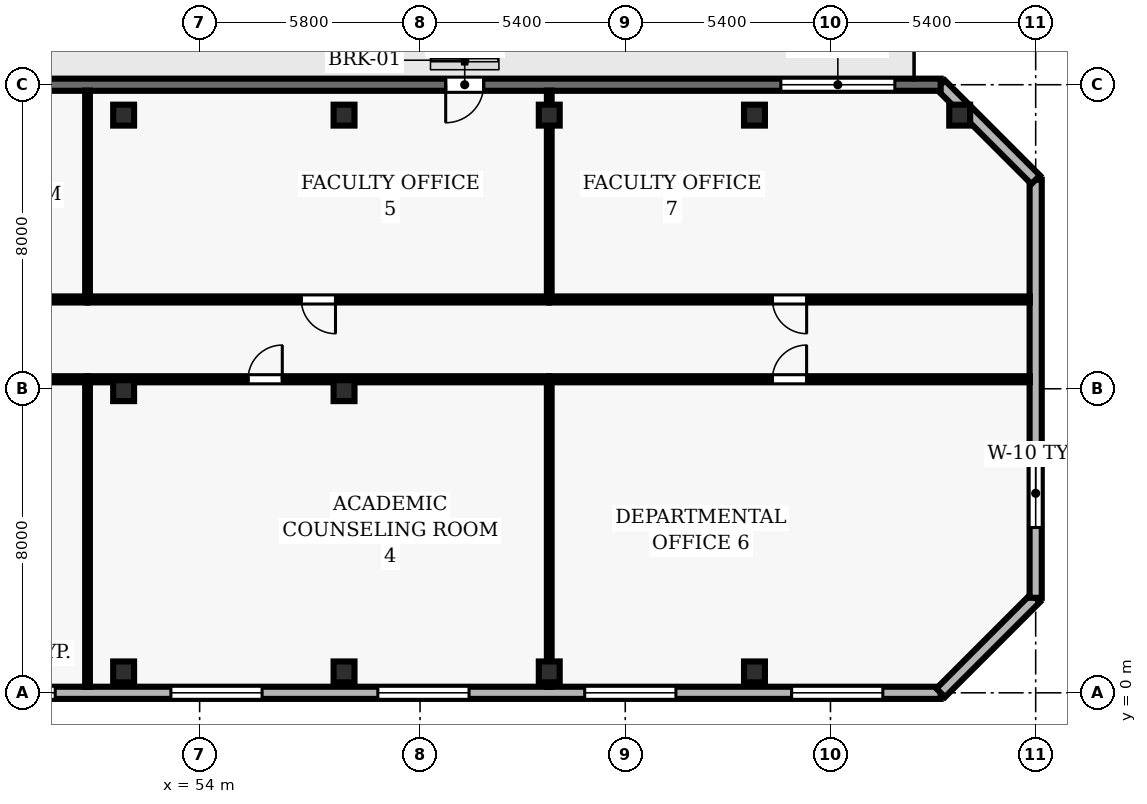
"""IFC4 building model, lengths in metres.
Left out: names, types, materials, properties, quantities, classifications, styles, units other than length and angle.
Written with IfcOpenShell. Run it as: python <this file> out.ifc"""

import sys

from ifc_helpers import new_model, si_unit, direction, frame, frame_2d, origin, origin_2d, place, context, subcontext, project, spatial, rectangle, hollow_rectangle, extrude, element, fill, save


model = new_model("IFC4")
c1 = context("Model", 3, precision=1e-05, world=origin(), true_north=direction((0.0, 1.0)))
c2 = subcontext(c1, "Body", "Model", "MODEL_VIEW")
j1 = project(units=[si_unit("LENGTHUNIT", "METRE"), si_unit("PLANEANGLEUNIT", "RADIAN")], contexts=[c1])
p1 = place(None, origin())
s1 = spatial("IfcSite", under=j1, at=p1, CompositionType="ELEMENT")
p2 = place(p1, origin())
s2 = spatial("IfcBuilding", under=s1, at=p2, CompositionType="ELEMENT")
p3 = place(p2, frame((0.0, 0.0, 81.7)))
s3 = spatial("IfcBuildingStorey", under=s2, at=p3, CompositionType="ELEMENT", Elevation=81.7)
for number, where, z_axis, x_axis in (
    (1, (52.0, 0.55, 0.0), (0.0, 0.0, 1.0), (1.0, 0.0, 0.0)),
    (2, (52.0, 7.95, 0.0), (0.0, 0.0, 1.0), (1.0, 0.0, 0.0)),
    (3, (52.0, 15.2, 0.0), (0.0, 0.0, 1.0), (1.0, 0.0, 0.0)),
    (4, (57.8, 0.55, 0.0), (0.0, 0.0, 1.0), (1.0, 0.0, 0.0)),
    (5, (57.8, 7.95, 0.0), (0.0, 0.0, 1.0), (1.0, 0.0, 0.0)),
    (6, (57.8, 15.2, 0.0), (0.0, 0.0, 1.0), (1.0, 0.0, 0.0)),
    (7, (63.2, 0.55, 0.0), (0.0, 0.0, 1.0), (1.0, 0.0, 0.0)),
    (8, (63.2, 15.2, 0.0), (0.0, 0.0, 1.0), (1.0, 0.0, 0.0)),
    (9, (68.6, 0.55, 0.0), (0.0, 0.0, 1.0), (1.0, 0.0, 0.0)),
    (10, (68.6, 15.2, 0.0), (0.0, 0.0, 1.0), (1.0, 0.0, 0.0)),
    (11, (74.0, 15.2, 0.0), (0.0, 0.0, 1.0), (1.0, 0.0, 0.0)),
):
    element("IfcColumn", number, at=place(p3, frame(where, z_axis=z_axis, x_axis=x_axis)), inside=s3, PredefinedType="COLUMN", context=c2, shape_type="SweptSolid", body=[
        extrude(hollow_rectangle(XDim=0.55, YDim=0.55, WallThickness=0.025, at=origin_2d()), origin(), (0.0, 0.0, 1.0), 3.9),
    ])
p4 = place(p3, frame((24.5, 0.0, 0.0), z_axis=(0.0, 0.0, 1.0), x_axis=(1.0, 0.0, 0.0)))
e12 = element("IfcWall", 12, at=p4, inside=s3, PredefinedType="SOLIDWALL", context=c2, shape_type="SweptSolid", body=[
    extrude(rectangle(XDim=49.0, YDim=0.32, at=frame_2d((24.5, 0.0))), origin(), (0.0, 0.0, 1.0), 3.69),
])
p5 = place(p4, frame((1.522, 0.0, 0.9)))
e13 = element("IfcOpeningElement", 13, at=p5, cuts=e12, PredefinedType="OPENING", context=c2, shape_type="SweptSolid", body=[
    extrude(rectangle(XDim=2.4, YDim=1.8, at=frame_2d((1.2, 0.9))), frame((0.0, 0.17, 0.0), z_axis=(0.0, -1.0, 0.0), x_axis=(1.0, 0.0, 0.0)), (0.0, 0.0, 1.0), 0.34),
])
p6 = place(p4, frame((17.856, 0.0, 0.9)))
e14 = element("IfcOpeningElement", 14, at=p6, cuts=e12, PredefinedType="OPENING", context=c2, shape_type="SweptSolid", body=[
    extrude(rectangle(XDim=2.4, YDim=1.8, at=frame_2d((1.2, 0.9))), frame((0.0, 0.17, 0.0), z_axis=(0.0, -1.0, 0.0), x_axis=(1.0, 0.0, 0.0)), (0.0, 0.0, 1.0), 0.34),
])
p7 = place(p4, frame((23.3, 0.0, 0.9)))
e15 = element("IfcOpeningElement", 15, at=p7, cuts=e12, PredefinedType="OPENING", context=c2, shape_type="SweptSolid", body=[
    extrude(rectangle(XDim=2.4, YDim=1.8, at=frame_2d((1.2, 0.9))), frame((0.0, 0.17, 0.0), z_axis=(0.0, -1.0, 0.0), x_axis=(1.0, 0.0, 0.0)), (0.0, 0.0, 1.0), 0.34),
])
p8 = place(p4, frame((28.744, 0.0, 0.9)))
e16 = element("IfcOpeningElement", 16, at=p8, cuts=e12, PredefinedType="OPENING", context=c2, shape_type="SweptSolid", body=[
    extrude(rectangle(XDim=2.4, YDim=1.8, at=frame_2d((1.2, 0.9))), frame((0.0, 0.17, 0.0), z_axis=(0.0, -1.0, 0.0), x_axis=(1.0, 0.0, 0.0)), (0.0, 0.0, 1.0), 0.34),
])
p9 = place(p4, frame((34.189, 0.0, 0.9)))
e17 = element("IfcOpeningElement", 17, at=p9, cuts=e12, PredefinedType="OPENING", context=c2, shape_type="SweptSolid", body=[
    extrude(rectangle(XDim=2.4, YDim=1.8, at=frame_2d((1.2, 0.9))), frame((0.0, 0.17, 0.0), z_axis=(0.0, -1.0, 0.0), x_axis=(1.0, 0.0, 0.0)), (0.0, 0.0, 1.0), 0.34),
])
p10 = place(p4, frame((39.633, 0.0, 0.9)))
e18 = element("IfcOpeningElement", 18, at=p10, cuts=e12, PredefinedType="OPENING", context=c2, shape_type="SweptSolid", body=[
    extrude(rectangle(XDim=2.4, YDim=1.8, at=frame_2d((1.2, 0.9))), frame((0.0, 0.17, 0.0), z_axis=(0.0, -1.0, 0.0), x_axis=(1.0, 0.0, 0.0)), (0.0, 0.0, 1.0), 0.34),
])
p11 = place(p4, frame((45.078, 0.0, 0.9)))
e19 = element("IfcOpeningElement", 19, at=p11, cuts=e12, PredefinedType="OPENING", context=c2, shape_type="SweptSolid", body=[
    extrude(rectangle(XDim=2.4, YDim=1.8, at=frame_2d((1.2, 0.9))), frame((0.0, 0.17, 0.0), z_axis=(0.0, -1.0, 0.0), x_axis=(1.0, 0.0, 0.0)), (0.0, 0.0, 1.0), 0.34),
])
p12 = place(p3, frame((73.5, 0.0, 0.0), z_axis=(0.0, 0.0, 1.0), x_axis=(0.707106781187, 0.707106781187, 0.0)))
e20 = element("IfcWall", 20, at=p12, inside=s3, PredefinedType="SOLIDWALL", context=c2, shape_type="SweptSolid", body=[
    extrude(rectangle(XDim=3.536, YDim=0.32, at=frame_2d((1.768, 0.0))), origin(), (0.0, 0.0, 1.0), 3.69),
])
p13 = place(p3, frame((76.0, 2.5, 0.0), z_axis=(0.0, 0.0, 1.0), x_axis=(0.0, 1.0, 0.0)))
e21 = element("IfcWall", 21, at=p13, inside=s3, PredefinedType="SOLIDWALL", context=c2, shape_type="SweptSolid", body=[
    extrude(rectangle(XDim=11.0, YDim=0.32, at=frame_2d((5.5, 0.0))), origin(), (0.0, 0.0, 1.0), 3.69),
])
p14 = place(p13, frame((1.85, 0.0, 0.9)))
e22 = element("IfcOpeningElement", 22, at=p14, cuts=e21, PredefinedType="OPENING", context=c2, shape_type="SweptSolid", body=[
    extrude(rectangle(XDim=1.8, YDim=2.2, at=frame_2d((0.9, 1.1))), frame((0.0, 0.17, 0.0), z_axis=(0.0, -1.0, 0.0), x_axis=(1.0, 0.0, 0.0)), (0.0, 0.0, 1.0), 0.34),
])
p15 = place(p3, frame((76.0, 13.5, 0.0), z_axis=(0.0, 0.0, 1.0), x_axis=(-0.707106781187, 0.707106781187, 0.0)))
e23 = element("IfcWall", 23, at=p15, inside=s3, PredefinedType="SOLIDWALL", context=c2, shape_type="SweptSolid", body=[
    extrude(rectangle(XDim=3.536, YDim=0.32, at=frame_2d((1.768, 0.0))), origin(), (0.0, 0.0, 1.0), 3.69),
])
p16 = place(p3, frame((73.5, 16.0, 0.0), z_axis=(0.0, 0.0, 1.0), x_axis=(-1.0, 0.0, 0.0)))
e24 = element("IfcWall", 24, at=p16, inside=s3, PredefinedType="SOLIDWALL", context=c2, shape_type="SweptSolid", body=[
    extrude(rectangle(XDim=25.25, YDim=0.32, at=frame_2d((12.625, 0.0))), origin(), (0.0, 0.0, 1.0), 3.69),
])
p17 = place(p16, frame((12.025, 0.0, 0.0)))
e25 = element("IfcOpeningElement", 25, at=p17, cuts=e24, PredefinedType="OPENING", context=c2, shape_type="SweptSolid", body=[
    extrude(rectangle(XDim=1.0, YDim=2.2, at=frame_2d((0.5, 1.1))), frame((0.0, 0.17, 0.0), z_axis=(0.0, -1.0, 0.0), x_axis=(1.0, 0.0, 0.0)), (0.0, 0.0, 1.0), 0.34),
])
p18 = place(p16, frame((1.206, 0.0, 0.9)))
e26 = element("IfcOpeningElement", 26, at=p18, cuts=e24, PredefinedType="OPENING", context=c2, shape_type="SweptSolid", body=[
    extrude(rectangle(XDim=3.0, YDim=2.2, at=frame_2d((1.5, 1.1))), frame((0.0, 0.17, 0.0), z_axis=(0.0, -1.0, 0.0), x_axis=(1.0, 0.0, 0.0)), (0.0, 0.0, 1.0), 0.34),
])
p19 = place(p3, frame((40.35, 8.25, 0.0), z_axis=(0.0, 0.0, 1.0), x_axis=(1.0, 0.0, 0.0)))
e27 = element("IfcWall", 27, at=p19, inside=s3, PredefinedType="PARTITIONING", context=c2, shape_type="SweptSolid", body=[
    extrude(rectangle(XDim=10.7, YDim=0.16, at=frame_2d((5.35, 0.0))), origin(), (0.0, 0.0, 1.0), 3.055),
])
p20 = place(p19, frame((3.15, 0.0, 0.0)))
e28 = element("IfcOpeningElement", 28, at=p20, cuts=e27, PredefinedType="OPENING", context=c2, shape_type="SweptSolid", body=[
    extrude(rectangle(XDim=0.9, YDim=2.1, at=frame_2d((0.45, 1.05))), frame((0.0, 0.09, 0.0), z_axis=(0.0, -1.0, 0.0), x_axis=(1.0, 0.0, 0.0)), (0.0, 0.0, 1.0), 0.18),
])
p21 = place(p3, frame((51.05, 8.25, 0.0), z_axis=(0.0, 0.0, 1.0), x_axis=(1.0, 0.0, 0.0)))
e29 = element("IfcWall", 29, at=p21, inside=s3, PredefinedType="PARTITIONING", context=c2, shape_type="SweptSolid", body=[
    extrude(rectangle(XDim=12.15, YDim=0.16, at=frame_2d((6.075, 0.0))), origin(), (0.0, 0.0, 1.0), 3.055),
])
p22 = place(p21, frame((4.225, 0.0, 0.0)))
e30 = element("IfcOpeningElement", 30, at=p22, cuts=e29, PredefinedType="OPENING", context=c2, shape_type="SweptSolid", body=[
    extrude(rectangle(XDim=0.9, YDim=2.1, at=frame_2d((0.45, 1.05))), frame((0.0, 0.09, 0.0), z_axis=(0.0, -1.0, 0.0), x_axis=(1.0, 0.0, 0.0)), (0.0, 0.0, 1.0), 0.18),
])
p23 = place(p3, frame((51.05, 10.35, 0.0), z_axis=(0.0, 0.0, 1.0), x_axis=(-1.0, 0.0, 0.0)))
e31 = element("IfcWall", 31, at=p23, inside=s3, PredefinedType="PARTITIONING", context=c2, shape_type="SweptSolid", body=[
    extrude(rectangle(XDim=10.7, YDim=0.16, at=frame_2d((5.35, 0.0))), origin(), (0.0, 0.0, 1.0), 3.277),
])
p24 = place(p23, frame((4.9, 0.0, 0.0)))
e32 = element("IfcOpeningElement", 32, at=p24, cuts=e31, PredefinedType="OPENING", context=c2, shape_type="SweptSolid", body=[
    extrude(rectangle(XDim=0.9, YDim=2.1, at=frame_2d((0.45, 1.05))), frame((0.0, 0.09, 0.0), z_axis=(0.0, -1.0, 0.0), x_axis=(1.0, 0.0, 0.0)), (0.0, 0.0, 1.0), 0.18),
])
p25 = place(p3, frame((63.2, 8.25, 0.0), z_axis=(0.0, 0.0, 1.0), x_axis=(1.0, 0.0, 0.0)))
e33 = element("IfcWall", 33, at=p25, inside=s3, PredefinedType="PARTITIONING", context=c2, shape_type="SweptSolid", body=[
    extrude(rectangle(XDim=12.645, YDim=0.16, at=frame_2d((6.323, 0.0))), origin(), (0.0, 0.0, 1.0), 3.69),
])
p26 = place(p25, frame((5.872, 0.0, 0.0)))
e34 = element("IfcOpeningElement", 34, at=p26, cuts=e33, PredefinedType="OPENING", context=c2, shape_type="SweptSolid", body=[
    extrude(rectangle(XDim=0.9, YDim=2.1, at=frame_2d((0.45, 1.05))), frame((0.0, 0.09, 0.0), z_axis=(0.0, -1.0, 0.0), x_axis=(1.0, 0.0, 0.0)), (0.0, 0.0, 1.0), 0.18),
])
p27 = place(p3, frame((63.2, 10.35, 0.0), z_axis=(0.0, 0.0, 1.0), x_axis=(-1.0, 0.0, 0.0)))
e35 = element("IfcWall", 35, at=p27, inside=s3, PredefinedType="PARTITIONING", context=c2, shape_type="SweptSolid", body=[
    extrude(rectangle(XDim=12.15, YDim=0.16, at=frame_2d((6.075, 0.0))), origin(), (0.0, 0.0, 1.0), 3.277),
])
p28 = place(p27, frame((5.625, 0.0, 0.0)))
e36 = element("IfcOpeningElement", 36, at=p28, cuts=e35, PredefinedType="OPENING", context=c2, shape_type="SweptSolid", body=[
    extrude(rectangle(XDim=0.9, YDim=2.1, at=frame_2d((0.45, 1.05))), frame((0.0, 0.09, 0.0), z_axis=(0.0, -1.0, 0.0), x_axis=(1.0, 0.0, 0.0)), (0.0, 0.0, 1.0), 0.18),
])
p29 = place(p3, frame((75.845, 10.35, 0.0), z_axis=(0.0, 0.0, 1.0), x_axis=(-1.0, 0.0, 0.0)))
e37 = element("IfcWall", 37, at=p29, inside=s3, PredefinedType="PARTITIONING", context=c2, shape_type="SweptSolid", body=[
    extrude(rectangle(XDim=12.645, YDim=0.16, at=frame_2d((6.323, 0.0))), origin(), (0.0, 0.0, 1.0), 3.277),
])
p30 = place(p29, frame((5.872, 0.0, 0.0)))
e38 = element("IfcOpeningElement", 38, at=p30, cuts=e37, PredefinedType="OPENING", context=c2, shape_type="SweptSolid", body=[
    extrude(rectangle(XDim=0.9, YDim=2.1, at=frame_2d((0.45, 1.05))), frame((0.0, 0.09, 0.0), z_axis=(0.0, -1.0, 0.0), x_axis=(1.0, 0.0, 0.0)), (0.0, 0.0, 1.0), 0.18),
])
p31 = place(p3, frame((51.05, 0.155, 0.0), z_axis=(0.0, 0.0, 1.0), x_axis=(0.0, 1.0, 0.0)))
e39 = element("IfcWall", 39, at=p31, inside=s3, PredefinedType="PARTITIONING", context=c2, shape_type="SweptSolid", body=[
    extrude(rectangle(XDim=8.02, YDim=0.125, at=frame_2d((4.01, 0.0))), origin(), (0.0, 0.0, 1.0), 3.69),
])
p32 = place(p3, frame((51.05, 10.425, 0.0), z_axis=(0.0, 0.0, 1.0), x_axis=(0.0, 1.0, 0.0)))
e40 = element("IfcWall", 40, at=p32, inside=s3, PredefinedType="PARTITIONING", context=c2, shape_type="SweptSolid", body=[
    extrude(rectangle(XDim=5.42, YDim=0.125, at=frame_2d((2.71, 0.0))), origin(), (0.0, 0.0, 1.0), 3.69),
])
p33 = place(p3, frame((63.2, 0.155, 0.0), z_axis=(0.0, 0.0, 1.0), x_axis=(0.0, 1.0, 0.0)))
e41 = element("IfcWall", 41, at=p33, inside=s3, PredefinedType="PARTITIONING", context=c2, shape_type="SweptSolid", body=[
    extrude(rectangle(XDim=8.02, YDim=0.125, at=frame_2d((4.01, 0.0))), origin(), (0.0, 0.0, 1.0), 3.055),
])
p34 = place(p3, frame((63.2, 10.425, 0.0), z_axis=(0.0, 0.0, 1.0), x_axis=(0.0, 1.0, 0.0)))
e42 = element("IfcWall", 42, at=p34, inside=s3, PredefinedType="PARTITIONING", context=c2, shape_type="SweptSolid", body=[
    extrude(rectangle(XDim=5.42, YDim=0.125, at=frame_2d((2.71, 0.0))), origin(), (0.0, 0.0, 1.0), 3.055),
])
p35 = place(p7, origin())
e43 = element("IfcWindow", 43, at=p35, inside=s3, PartitioningType="SINGLE_PANEL", PredefinedType="WINDOW", context=c2, shape_type="SweptSolid", body=[
    extrude(rectangle(XDim=2.4, YDim=1.8, at=frame_2d((1.2, 0.9))), frame((0.0, 0.03, 0.0), z_axis=(0.0, -1.0, 0.0), x_axis=(1.0, 0.0, 0.0)), (0.0, 0.0, 1.0), 0.06),
])
fill(e15, e43)
p36 = place(p8, origin())
e44 = element("IfcWindow", 44, at=p36, inside=s3, PartitioningType="SINGLE_PANEL", PredefinedType="WINDOW", context=c2, shape_type="SweptSolid", body=[
    extrude(rectangle(XDim=2.4, YDim=1.8, at=frame_2d((1.2, 0.9))), frame((0.0, 0.03, 0.0), z_axis=(0.0, -1.0, 0.0), x_axis=(1.0, 0.0, 0.0)), (0.0, 0.0, 1.0), 0.06),
])
fill(e16, e44)
p37 = place(p9, origin())
e45 = element("IfcWindow", 45, at=p37, inside=s3, PartitioningType="SINGLE_PANEL", PredefinedType="WINDOW", context=c2, shape_type="SweptSolid", body=[
    extrude(rectangle(XDim=2.4, YDim=1.8, at=frame_2d((1.2, 0.9))), frame((0.0, 0.03, 0.0), z_axis=(0.0, -1.0, 0.0), x_axis=(1.0, 0.0, 0.0)), (0.0, 0.0, 1.0), 0.06),
])
fill(e17, e45)
p38 = place(p10, origin())
e46 = element("IfcWindow", 46, at=p38, inside=s3, PartitioningType="SINGLE_PANEL", PredefinedType="WINDOW", context=c2, shape_type="SweptSolid", body=[
    extrude(rectangle(XDim=2.4, YDim=1.8, at=frame_2d((1.2, 0.9))), frame((0.0, 0.03, 0.0), z_axis=(0.0, -1.0, 0.0), x_axis=(1.0, 0.0, 0.0)), (0.0, 0.0, 1.0), 0.06),
])
fill(e18, e46)
p39 = place(p11, origin())
e47 = element("IfcWindow", 47, at=p39, inside=s3, PartitioningType="SINGLE_PANEL", PredefinedType="WINDOW", context=c2, shape_type="SweptSolid", body=[
    extrude(rectangle(XDim=2.4, YDim=1.8, at=frame_2d((1.2, 0.9))), frame((0.0, 0.03, 0.0), z_axis=(0.0, -1.0, 0.0), x_axis=(1.0, 0.0, 0.0)), (0.0, 0.0, 1.0), 0.06),
])
fill(e19, e47)
p40 = place(p14, origin())
e48 = element("IfcWindow", 48, at=p40, inside=s3, PartitioningType="SINGLE_PANEL", PredefinedType="WINDOW", context=c2, shape_type="SweptSolid", body=[
    extrude(rectangle(XDim=1.8, YDim=2.2, at=frame_2d((0.9, 1.1))), frame((0.0, 0.03, 0.0), z_axis=(0.0, -1.0, 0.0), x_axis=(1.0, 0.0, 0.0)), (0.0, 0.0, 1.0), 0.06),
])
fill(e22, e48)
p41 = place(p17, origin())
e49 = element("IfcDoor", 49, at=p41, inside=s3, OperationType="SINGLE_SWING_RIGHT", PredefinedType="DOOR", context=c2, shape_type="SweptSolid", body=[
    extrude(rectangle(XDim=1.0, YDim=2.2, at=frame_2d((0.5, 1.1))), frame((0.0, 0.025, 0.0), z_axis=(0.0, -1.0, 0.0), x_axis=(1.0, 0.0, 0.0)), (0.0, 0.0, 1.0), 0.05),
])
fill(e25, e49)
p42 = place(p18, origin())
e50 = element("IfcWindow", 50, at=p42, inside=s3, PartitioningType="SINGLE_PANEL", PredefinedType="WINDOW", context=c2, shape_type="SweptSolid", body=[
    extrude(rectangle(XDim=3.0, YDim=2.2, at=frame_2d((1.5, 1.1))), frame((0.0, 0.03, 0.0), z_axis=(0.0, -1.0, 0.0), x_axis=(1.0, 0.0, 0.0)), (0.0, 0.0, 1.0), 0.06),
])
fill(e26, e50)
p43 = place(p22, origin())
e51 = element("IfcDoor", 51, at=p43, inside=s3, OperationType="SINGLE_SWING_RIGHT", PredefinedType="DOOR", context=c2, shape_type="SweptSolid", body=[
    extrude(rectangle(XDim=0.9, YDim=2.1, at=frame_2d((0.45, 1.05))), frame((0.0, 0.025, 0.0), z_axis=(0.0, -1.0, 0.0), x_axis=(1.0, 0.0, 0.0)), (0.0, 0.0, 1.0), 0.05),
])
fill(e30, e51)
p44 = place(p28, origin())
e52 = element("IfcDoor", 52, at=p44, inside=s3, OperationType="SINGLE_SWING_LEFT", PredefinedType="DOOR", context=c2, shape_type="SweptSolid", body=[
    extrude(rectangle(XDim=0.9, YDim=2.1, at=frame_2d((0.45, 1.05))), frame((0.0, 0.025, 0.0), z_axis=(0.0, -1.0, 0.0), x_axis=(1.0, 0.0, 0.0)), (0.0, 0.0, 1.0), 0.05),
])
fill(e36, e52)
p45 = place(p26, origin())
e53 = element("IfcDoor", 53, at=p45, inside=s3, OperationType="SINGLE_SWING_RIGHT", PredefinedType="DOOR", context=c2, shape_type="SweptSolid", body=[
    extrude(rectangle(XDim=0.9, YDim=2.1, at=frame_2d((0.45, 1.05))), frame((0.0, 0.025, 0.0), z_axis=(0.0, -1.0, 0.0), x_axis=(1.0, 0.0, 0.0)), (0.0, 0.0, 1.0), 0.05),
])
fill(e34, e53)
p46 = place(p30, origin())
e54 = element("IfcDoor", 54, at=p46, inside=s3, OperationType="SINGLE_SWING_LEFT", PredefinedType="DOOR", context=c2, shape_type="SweptSolid", body=[
    extrude(rectangle(XDim=0.9, YDim=2.1, at=frame_2d((0.45, 1.05))), frame((0.0, 0.025, 0.0), z_axis=(0.0, -1.0, 0.0), x_axis=(1.0, 0.0, 0.0)), (0.0, 0.0, 1.0), 0.05),
])
fill(e38, e54)
save(model, sys.argv[1])
